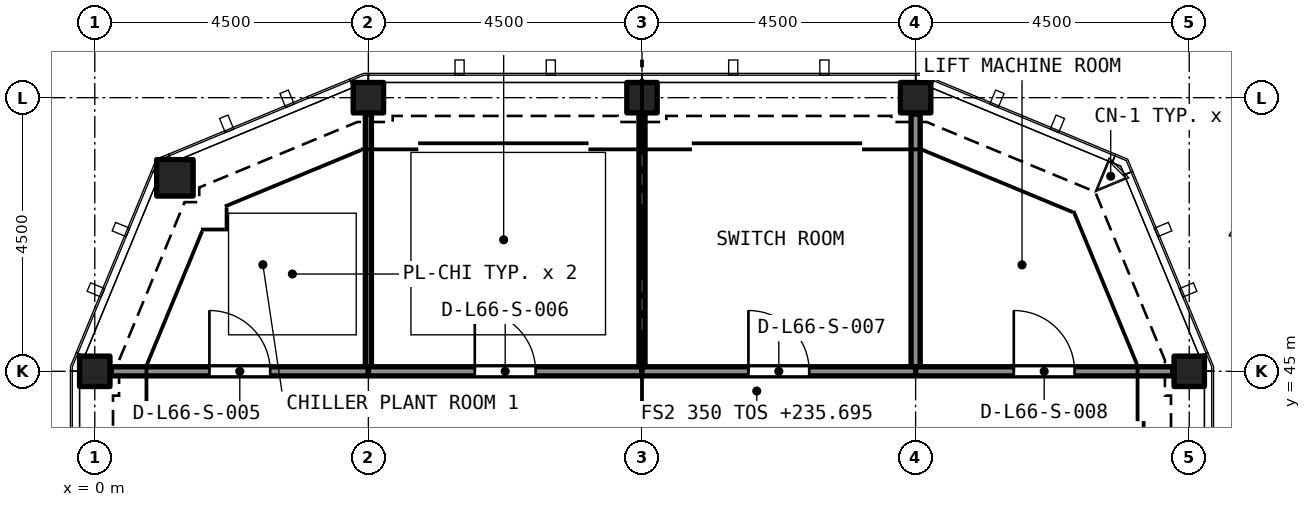
"""IFC4 building model, lengths in metres.
Left out: names, types, materials, properties, quantities, classifications, styles, units other than length and angle.
Written with IfcOpenShell. Run it as: python <this file> out.ifc"""

import sys

from ifc_helpers import new_model, si_unit, direction, frame, frame_2d, origin, origin_2d, place, context, subcontext, project, spatial, rectangle, hollow_rectangle, extrude, element, fill, save


model = new_model("IFC4")
c1 = context("Model", 3, precision=1e-05, world=origin(), true_north=direction((0.0, 1.0)))
c2 = subcontext(c1, "Body", "Model", "MODEL_VIEW")
j1 = project(units=[si_unit("LENGTHUNIT", "METRE"), si_unit("PLANEANGLEUNIT", "RADIAN")], contexts=[c1])
p1 = place(None, origin())
s1 = spatial("IfcSite", under=j1, at=p1, CompositionType="ELEMENT")
p2 = place(p1, origin())
s2 = spatial("IfcBuilding", under=s1, at=p2, CompositionType="ELEMENT")
p3 = place(p2, frame((0.0, 0.0, 235.695)))
s3 = spatial("IfcBuildingStorey", under=s2, at=p3, CompositionType="ELEMENT", Elevation=235.695)
for number, where, z_axis, x_axis in (
    (1, (0.0, 45.0, 0.0), (0.0, 0.0, 1.0), (1.0, 0.0, 0.0)),
    (2, (18.0, 45.0, 0.0), (0.0, 0.0, 1.0), (1.0, 0.0, 0.0)),
):
    element("IfcColumn", number, at=place(p3, frame(where, z_axis=z_axis, x_axis=x_axis)), inside=s3, PredefinedType="COLUMN", context=c2, shape_type="SweptSolid", body=[
        extrude(hollow_rectangle(XDim=0.5, YDim=0.5, WallThickness=0.04, at=origin_2d()), origin(), (0.0, 0.0, 1.0), 11.4),
    ])
p4 = place(p3, frame((1.318, 48.182, 0.0), z_axis=(0.0, 0.0, 1.0), x_axis=(1.0, 0.0, 0.0)))
e3 = element("IfcColumn", 3, at=p4, inside=s3, PredefinedType="COLUMN", context=c2, shape_type="SweptSolid", body=[
    extrude(hollow_rectangle(XDim=0.6, YDim=0.6, WallThickness=0.05, at=origin_2d()), origin(), (0.0, 0.0, 1.0), 11.4),
])
for number, where, z_axis, x_axis in (
    (4, (4.5, 49.5, 0.0), (0.0, 0.0, 1.0), (1.0, 0.0, 0.0)),
    (5, (9.0, 49.5, 0.0), (0.0, 0.0, 1.0), (1.0, 0.0, 0.0)),
    (6, (13.5, 49.5, 0.0), (0.0, 0.0, 1.0), (1.0, 0.0, 0.0)),
):
    element("IfcColumn", number, at=place(p3, frame(where, z_axis=z_axis, x_axis=x_axis)), inside=s3, PredefinedType="COLUMN", context=c2, shape_type="SweptSolid", body=[
        extrude(hollow_rectangle(XDim=0.5, YDim=0.5, WallThickness=0.04, at=origin_2d()), origin(), (0.0, 0.0, 1.0), 11.4),
    ])
p5 = place(p3, frame((4.5, 45.075, 0.0), z_axis=(0.0, 0.0, 1.0), x_axis=(0.0, 1.0, 0.0)))
e7 = element("IfcWall", 7, at=p5, inside=s3, PredefinedType="PARTITIONING", context=c2, shape_type="SweptSolid", body=[
    extrude(rectangle(XDim=4.155, YDim=0.1, at=frame_2d((2.077, 0.0))), origin(), (0.0, 0.0, 1.0), 11.05),
])
p6 = place(p3, frame((0.271, 45.0, 0.0), z_axis=(0.0, 0.0, 1.0), x_axis=(1.0, 0.0, 0.0)))
e8 = element("IfcWall", 8, at=p6, inside=s3, PredefinedType="PARTITIONING", context=c2, shape_type="SweptSolid", body=[
    extrude(rectangle(XDim=4.229, YDim=0.15, at=frame_2d((2.115, 0.0))), origin(), (0.0, 0.0, 1.0), 11.05),
])
p7 = place(p6, frame((1.615, 0.0, 0.0)))
e9 = element("IfcOpeningElement", 9, at=p7, cuts=e8, PredefinedType="OPENING", context=c2, shape_type="SweptSolid", body=[
    extrude(rectangle(XDim=1.0, YDim=2.1, at=frame_2d((0.5, 1.05))), frame((0.0, 0.085, 0.0), z_axis=(0.0, -1.0, 0.0), x_axis=(1.0, 0.0, 0.0)), (0.0, 0.0, 1.0), 0.17),
])
p8 = place(p3, frame((9.0, 45.075, 0.0), z_axis=(0.0, 0.0, 1.0), x_axis=(0.0, 1.0, 0.0)))
e10 = element("IfcWall", 10, at=p8, inside=s3, PredefinedType="PARTITIONING", context=c2, shape_type="SweptSolid", body=[
    extrude(rectangle(XDim=4.175, YDim=0.1, at=frame_2d((2.087, 0.0))), origin(), (0.0, 0.0, 1.0), 11.05),
])
p9 = place(p3, frame((4.5, 45.0, 0.0), z_axis=(0.0, 0.0, 1.0), x_axis=(1.0, 0.0, 0.0)))
e11 = element("IfcWall", 11, at=p9, inside=s3, PredefinedType="PARTITIONING", context=c2, shape_type="SweptSolid", body=[
    extrude(rectangle(XDim=4.5, YDim=0.15, at=frame_2d((2.25, 0.0))), origin(), (0.0, 0.0, 1.0), 11.05),
])
p10 = place(p9, frame((1.75, 0.0, 0.0)))
e12 = element("IfcOpeningElement", 12, at=p10, cuts=e11, PredefinedType="OPENING", context=c2, shape_type="SweptSolid", body=[
    extrude(rectangle(XDim=1.0, YDim=2.1, at=frame_2d((0.5, 1.05))), frame((0.0, 0.085, 0.0), z_axis=(0.0, -1.0, 0.0), x_axis=(1.0, 0.0, 0.0)), (0.0, 0.0, 1.0), 0.17),
])
p11 = place(p3, frame((13.5, 45.075, 0.0), z_axis=(0.0, 0.0, 1.0), x_axis=(0.0, 1.0, 0.0)))
e13 = element("IfcWall", 13, at=p11, inside=s3, PredefinedType="PARTITIONING", context=c2, shape_type="SweptSolid", body=[
    extrude(rectangle(XDim=4.155, YDim=0.15, at=frame_2d((2.077, 0.0))), origin(), (0.0, 0.0, 1.0), 11.05),
])
p12 = place(p3, frame((9.0, 45.0, 0.0), z_axis=(0.0, 0.0, 1.0), x_axis=(1.0, 0.0, 0.0)))
e14 = element("IfcWall", 14, at=p12, inside=s3, PredefinedType="PARTITIONING", context=c2, shape_type="SweptSolid", body=[
    extrude(rectangle(XDim=4.5, YDim=0.15, at=frame_2d((2.25, 0.0))), origin(), (0.0, 0.0, 1.0), 11.05),
])
p13 = place(p12, frame((1.75, 0.0, 0.0)))
e15 = element("IfcOpeningElement", 15, at=p13, cuts=e14, PredefinedType="OPENING", context=c2, shape_type="SweptSolid", body=[
    extrude(rectangle(XDim=1.0, YDim=2.1, at=frame_2d((0.5, 1.05))), frame((0.0, 0.085, 0.0), z_axis=(0.0, -1.0, 0.0), x_axis=(1.0, 0.0, 0.0)), (0.0, 0.0, 1.0), 0.17),
])
p14 = place(p3, frame((13.5, 45.0, 0.0), z_axis=(0.0, 0.0, 1.0), x_axis=(1.0, 0.0, 0.0)))
e16 = element("IfcWall", 16, at=p14, inside=s3, PredefinedType="PARTITIONING", context=c2, shape_type="SweptSolid", body=[
    extrude(rectangle(XDim=4.229, YDim=0.15, at=frame_2d((2.115, 0.0))), origin(), (0.0, 0.0, 1.0), 11.05),
])
p15 = place(p14, frame((1.615, 0.0, 0.0)))
e17 = element("IfcOpeningElement", 17, at=p15, cuts=e16, PredefinedType="OPENING", context=c2, shape_type="SweptSolid", body=[
    extrude(rectangle(XDim=1.0, YDim=2.1, at=frame_2d((0.5, 1.05))), frame((0.0, 0.085, 0.0), z_axis=(0.0, -1.0, 0.0), x_axis=(1.0, 0.0, 0.0)), (0.0, 0.0, 1.0), 0.17),
])
p16 = place(p7, origin())
e18 = element("IfcDoor", 18, at=p16, inside=s3, OperationType="SINGLE_SWING_RIGHT", PredefinedType="DOOR", context=c2, shape_type="SweptSolid", body=[
    extrude(rectangle(XDim=1.0, YDim=2.1, at=frame_2d((0.5, 1.05))), frame((0.0, 0.025, 0.0), z_axis=(0.0, -1.0, 0.0), x_axis=(1.0, 0.0, 0.0)), (0.0, 0.0, 1.0), 0.05),
])
fill(e9, e18)
p17 = place(p10, origin())
e19 = element("IfcDoor", 19, at=p17, inside=s3, OperationType="SINGLE_SWING_RIGHT", PredefinedType="DOOR", context=c2, shape_type="SweptSolid", body=[
    extrude(rectangle(XDim=1.0, YDim=2.1, at=frame_2d((0.5, 1.05))), frame((0.0, 0.025, 0.0), z_axis=(0.0, -1.0, 0.0), x_axis=(1.0, 0.0, 0.0)), (0.0, 0.0, 1.0), 0.05),
])
fill(e12, e19)
p18 = place(p13, origin())
e20 = element("IfcDoor", 20, at=p18, inside=s3, OperationType="SINGLE_SWING_RIGHT", PredefinedType="DOOR", context=c2, shape_type="SweptSolid", body=[
    extrude(rectangle(XDim=1.0, YDim=2.1, at=frame_2d((0.5, 1.05))), frame((0.0, 0.025, 0.0), z_axis=(0.0, -1.0, 0.0), x_axis=(1.0, 0.0, 0.0)), (0.0, 0.0, 1.0), 0.05),
])
fill(e15, e20)
p19 = place(p15, origin())
e21 = element("IfcDoor", 21, at=p19, inside=s3, OperationType="SINGLE_SWING_RIGHT", PredefinedType="DOOR", context=c2, shape_type="SweptSolid", body=[
    extrude(rectangle(XDim=1.0, YDim=2.1, at=frame_2d((0.5, 1.05))), frame((0.0, 0.025, 0.0), z_axis=(0.0, -1.0, 0.0), x_axis=(1.0, 0.0, 0.0)), (0.0, 0.0, 1.0), 0.05),
])
fill(e17, e21)
save(model, sys.argv[1])
